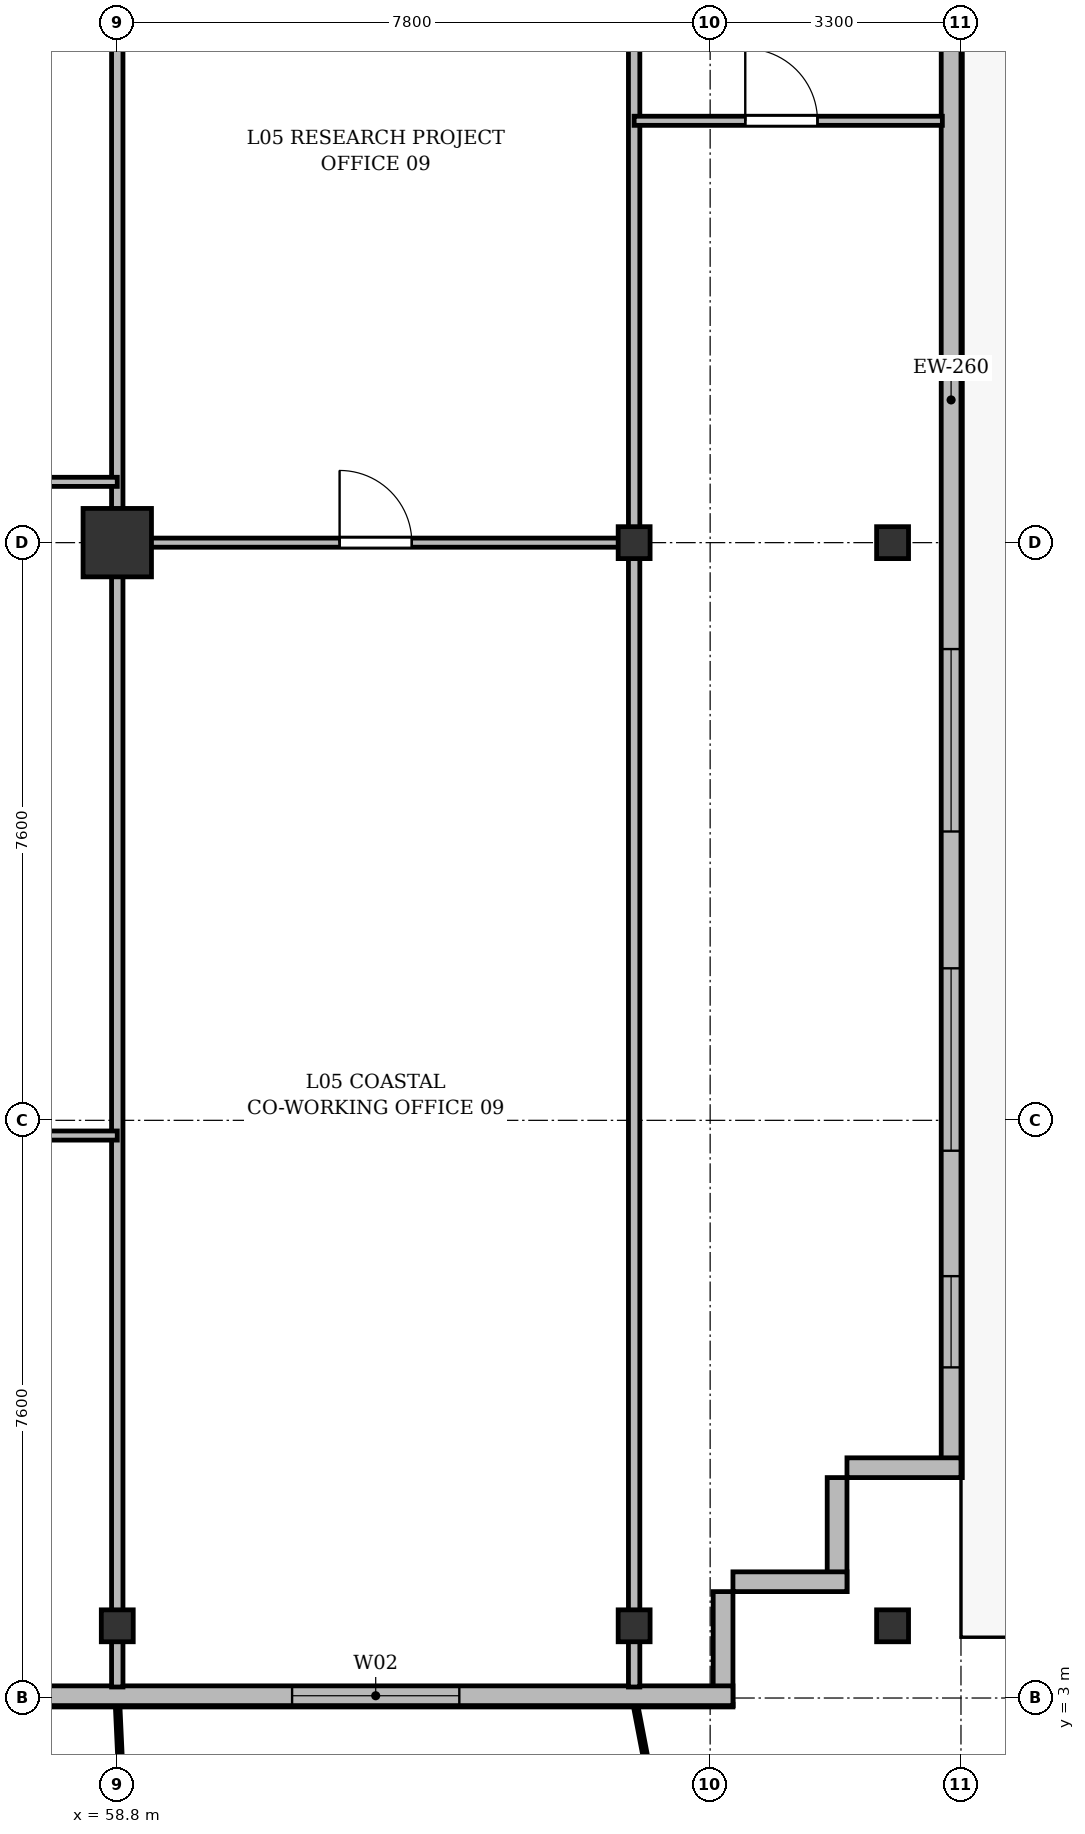
"""IFC4 building model, lengths in metres.
Left out: names, types, materials, properties, quantities, classifications, styles, units other than length and angle.
Written with IfcOpenShell. Run it as: python <this file> out.ifc"""

import sys

from ifc_helpers import new_model, si_unit, direction, frame, frame_2d, origin, origin_2d, place, context, subcontext, project, spatial, rectangle, i_section, extrude, source, transform, mapped, element, fill, save


model = new_model("IFC4")
c1 = context("Model", 3, precision=1e-05, world=origin(), true_north=direction((0.0, 1.0)))
c2 = subcontext(c1, "Body", "Model", "MODEL_VIEW")
j1 = project(units=[si_unit("LENGTHUNIT", "METRE"), si_unit("PLANEANGLEUNIT", "RADIAN")], contexts=[c1])
p1 = place(None, origin())
s1 = spatial("IfcSite", under=j1, at=p1, CompositionType="ELEMENT")
p2 = place(p1, origin())
s2 = spatial("IfcBuilding", under=s1, at=p2, CompositionType="ELEMENT")
p3 = place(p2, frame((0.0, 0.0, 23.5)))
s3 = spatial("IfcBuildingStorey", under=s2, at=p3, CompositionType="ELEMENT", Elevation=23.5)
m1 = source(origin(), c2, "Body", "SweptSolid", [
    extrude(i_section(OverallWidth=0.42, OverallDepth=0.42, WebThickness=0.026, FlangeThickness=0.04, at=origin_2d()), origin(), (0.0, 0.0, 1.0), 3.6),
])
p4 = place(p3, frame((58.8, 3.95, 0.0), z_axis=(0.0, 0.0, 1.0), x_axis=(1.0, 0.0, 0.0)))
e1 = element("IfcColumn", 1, at=p4, inside=s3, PredefinedType="COLUMN", context=c2, shape_type="MappedRepresentation", body=[
    mapped(m1, transform((0.0, 0.0, 0.0), x_axis=(1.0, 0.0, 0.0), y_axis=(0.0, 1.0, 0.0), z_axis=(0.0, 0.0, 1.0), scale=1.0)),
])
m2 = source(origin(), c2, "Body", "SweptSolid", [
    extrude(rectangle(XDim=0.9, YDim=0.9, at=origin_2d()), origin(), (0.0, 0.0, 1.0), 3.6),
])
p5 = place(p3, frame((58.8, 18.2, 0.0), z_axis=(0.0, 0.0, 1.0), x_axis=(1.0, 0.0, 0.0)))
e2 = element("IfcColumn", 2, at=p5, inside=s3, PredefinedType="COLUMN", context=c2, shape_type="MappedRepresentation", body=[
    mapped(m2, transform((0.0, 0.0, 0.0), x_axis=(1.0, 0.0, 0.0), y_axis=(0.0, 1.0, 0.0), z_axis=(0.0, 0.0, 1.0), scale=1.0)),
])
for number, where, z_axis, x_axis in (
    (3, (65.6, 3.95, 0.0), (0.0, 0.0, 1.0), (1.0, 0.0, 0.0)),
    (4, (65.6, 18.2, 0.0), (0.0, 0.0, 1.0), (1.0, 0.0, 0.0)),
    (5, (69.0, 3.95, 0.0), (0.0, 0.0, 1.0), (1.0, 0.0, 0.0)),
    (6, (69.0, 18.2, 0.0), (0.0, 0.0, 1.0), (1.0, 0.0, 0.0)),
):
    element("IfcColumn", number, at=place(p3, frame(where, z_axis=z_axis, x_axis=x_axis)), inside=s3, PredefinedType="COLUMN", context=c2, shape_type="MappedRepresentation", body=[
        mapped(m1, transform((0.0, 0.0, 0.0), x_axis=(1.0, 0.0, 0.0), y_axis=(0.0, 1.0, 0.0), z_axis=(0.0, 0.0, 1.0), scale=1.0)),
    ])
p6 = place(p3, frame((69.77, 45.5, 0.0), z_axis=(0.0, 0.0, 1.0), x_axis=(0.0, -1.0, 0.0)))
e7 = element("IfcWall", 7, at=p6, inside=s3, PredefinedType="SOLIDWALL", context=c2, shape_type="SweptSolid", body=[
    extrude(rectangle(XDim=39.6, YDim=0.26, at=frame_2d((19.8, 0.0))), origin(), (0.0, 0.0, 1.0), 3.34),
])
p7 = place(p6, frame((9.745, 0.0, 0.0)))
e8 = element("IfcOpeningElement", 8, at=p7, cuts=e7, PredefinedType="OPENING", context=c2, shape_type="SweptSolid", body=[
    extrude(rectangle(XDim=1.2, YDim=2.2, at=frame_2d((0.6, 1.1))), frame((0.0, 0.14, 0.0), z_axis=(0.0, -1.0, 0.0), x_axis=(1.0, 0.0, 0.0)), (0.0, 0.0, 1.0), 0.28),
])
p8 = place(p6, frame((36.95, 0.0, 0.92)))
e9 = element("IfcOpeningElement", 9, at=p8, cuts=e7, PredefinedType="OPENING", context=c2, shape_type="SweptSolid", body=[
    extrude(rectangle(XDim=1.2, YDim=1.65, at=frame_2d((0.6, 0.825))), frame((0.0, 0.14, 0.0), z_axis=(0.0, -1.0, 0.0), x_axis=(1.0, 0.0, 0.0)), (0.0, 0.0, 1.0), 0.28),
])
p9 = place(p6, frame((32.9, 0.0, 0.92)))
e10 = element("IfcOpeningElement", 10, at=p9, cuts=e7, PredefinedType="OPENING", context=c2, shape_type="SweptSolid", body=[
    extrude(rectangle(XDim=2.4, YDim=2.1, at=frame_2d((1.2, 1.05))), frame((0.0, 0.14, 0.0), z_axis=(0.0, -1.0, 0.0), x_axis=(1.0, 0.0, 0.0)), (0.0, 0.0, 1.0), 0.28),
])
p10 = place(p6, frame((28.7, 0.0, 0.92)))
e11 = element("IfcOpeningElement", 11, at=p10, cuts=e7, PredefinedType="OPENING", context=c2, shape_type="SweptSolid", body=[
    extrude(rectangle(XDim=2.4, YDim=2.1, at=frame_2d((1.2, 1.05))), frame((0.0, 0.14, 0.0), z_axis=(0.0, -1.0, 0.0), x_axis=(1.0, 0.0, 0.0)), (0.0, 0.0, 1.0), 0.28),
])
p11 = place(p6, frame((4.5, 0.0, 0.92)))
e12 = element("IfcOpeningElement", 12, at=p11, cuts=e7, PredefinedType="OPENING", context=c2, shape_type="SweptSolid", body=[
    extrude(rectangle(XDim=1.2, YDim=1.65, at=frame_2d((0.6, 0.825))), frame((0.0, 0.14, 0.0), z_axis=(0.0, -1.0, 0.0), x_axis=(1.0, 0.0, 0.0)), (0.0, 0.0, 1.0), 0.28),
])
p12 = place(p6, frame((1.15, 0.0, 0.92)))
e13 = element("IfcOpeningElement", 13, at=p12, cuts=e7, PredefinedType="OPENING", context=c2, shape_type="SweptSolid", body=[
    extrude(rectangle(XDim=1.2, YDim=1.65, at=frame_2d((0.6, 0.825))), frame((0.0, 0.14, 0.0), z_axis=(0.0, -1.0, 0.0), x_axis=(1.0, 0.0, 0.0)), (0.0, 0.0, 1.0), 0.28),
])
p13 = place(p3, frame((69.9, 6.03, 0.0), z_axis=(0.0, 0.0, 1.0), x_axis=(-1.0, 0.0, 0.0)))
e14 = element("IfcWall", 14, at=p13, inside=s3, PredefinedType="SOLIDWALL", context=c2, shape_type="SweptSolid", body=[
    extrude(rectangle(XDim=1.5, YDim=0.26, at=frame_2d((0.75, 0.0))), origin(), (0.0, 0.0, 1.0), 2.752),
])
for number, where, z_axis, x_axis in (
    (15, (68.27, 5.9, 0.0), (0.0, 0.0, 1.0), (0.0, -1.0, 0.0)),
    (16, (68.4, 4.53, 0.0), (0.0, 0.0, 1.0), (-1.0, 0.0, 0.0)),
):
    element("IfcWall", number, at=place(p3, frame(where, z_axis=z_axis, x_axis=x_axis)), inside=s3, PredefinedType="SOLIDWALL", context=c2, shape_type="SweptSolid", body=[
        extrude(rectangle(XDim=1.5, YDim=0.26, at=frame_2d((0.75, 0.0))), origin(), (0.0, 0.0, 1.0), 3.34),
    ])
p14 = place(p3, frame((66.77, 4.4, 0.0), z_axis=(0.0, 0.0, 1.0), x_axis=(0.0, -1.0, 0.0)))
e17 = element("IfcWall", 17, at=p14, inside=s3, PredefinedType="SOLIDWALL", context=c2, shape_type="SweptSolid", body=[
    extrude(rectangle(XDim=1.5, YDim=0.26, at=frame_2d((0.75, 0.0))), origin(), (0.0, 0.0, 1.0), 2.69),
])
p15 = place(p3, frame((66.9, 3.03, 0.0), z_axis=(0.0, 0.0, 1.0), x_axis=(-1.0, 0.0, 0.0)))
e18 = element("IfcWall", 18, at=p15, inside=s3, PredefinedType="SOLIDWALL", context=c2, shape_type="SweptSolid", body=[
    extrude(rectangle(XDim=59.4, YDim=0.26, at=frame_2d((29.7, 0.0))), origin(), (0.0, 0.0, 1.0), 3.34),
])
p16 = place(p15, frame((3.6, 0.0, 0.9)))
e19 = element("IfcOpeningElement", 19, at=p16, cuts=e18, PredefinedType="OPENING", context=c2, shape_type="SweptSolid", body=[
    extrude(rectangle(XDim=2.2, YDim=1.8, at=frame_2d((1.1, 0.9))), frame((0.0, 0.14, 0.0), z_axis=(0.0, -1.0, 0.0), x_axis=(1.0, 0.0, 0.0)), (0.0, 0.0, 1.0), 0.28),
])
p17 = place(p15, frame((9.3, 0.0, 0.9)))
e20 = element("IfcOpeningElement", 20, at=p17, cuts=e18, PredefinedType="OPENING", context=c2, shape_type="SweptSolid", body=[
    extrude(rectangle(XDim=1.5, YDim=1.75, at=frame_2d((0.75, 0.875))), frame((0.0, 0.14, 0.0), z_axis=(0.0, -1.0, 0.0), x_axis=(1.0, 0.0, 0.0)), (0.0, 0.0, 1.0), 0.28),
])
p18 = place(p15, frame((12.95, 0.0, 0.9)))
e21 = element("IfcOpeningElement", 21, at=p18, cuts=e18, PredefinedType="OPENING", context=c2, shape_type="SweptSolid", body=[
    extrude(rectangle(XDim=2.0, YDim=1.95, at=frame_2d((1.0, 0.975))), frame((0.0, 0.14, 0.0), z_axis=(0.0, -1.0, 0.0), x_axis=(1.0, 0.0, 0.0)), (0.0, 0.0, 1.0), 0.28),
])
p19 = place(p15, frame((17.007, 0.0, 0.0)))
e22 = element("IfcOpeningElement", 22, at=p19, cuts=e18, PredefinedType="OPENING", context=c2, shape_type="SweptSolid", body=[
    extrude(rectangle(XDim=1.2, YDim=2.2, at=frame_2d((0.6, 1.1))), frame((0.0, 0.14, 0.0), z_axis=(0.0, -1.0, 0.0), x_axis=(1.0, 0.0, 0.0)), (0.0, 0.0, 1.0), 0.28),
])
p20 = place(p15, frame((20.4, 0.0, 0.9)))
e23 = element("IfcOpeningElement", 23, at=p20, cuts=e18, PredefinedType="OPENING", context=c2, shape_type="SweptSolid", body=[
    extrude(rectangle(XDim=1.8, YDim=1.8, at=frame_2d((0.9, 0.9))), frame((0.0, 0.14, 0.0), z_axis=(0.0, -1.0, 0.0), x_axis=(1.0, 0.0, 0.0)), (0.0, 0.0, 1.0), 0.28),
])
p21 = place(p15, frame((23.65, 0.0, 0.9)))
e24 = element("IfcOpeningElement", 24, at=p21, cuts=e18, PredefinedType="OPENING", context=c2, shape_type="SweptSolid", body=[
    extrude(rectangle(XDim=2.2, YDim=1.8, at=frame_2d((1.1, 0.9))), frame((0.0, 0.14, 0.0), z_axis=(0.0, -1.0, 0.0), x_axis=(1.0, 0.0, 0.0)), (0.0, 0.0, 1.0), 0.28),
])
p22 = place(p15, frame((27.3, 0.0, 0.9)))
e25 = element("IfcOpeningElement", 25, at=p22, cuts=e18, PredefinedType="OPENING", context=c2, shape_type="SweptSolid", body=[
    extrude(rectangle(XDim=1.5, YDim=1.75, at=frame_2d((0.75, 0.875))), frame((0.0, 0.14, 0.0), z_axis=(0.0, -1.0, 0.0), x_axis=(1.0, 0.0, 0.0)), (0.0, 0.0, 1.0), 0.28),
])
p23 = place(p15, frame((32.0, 0.0, 0.9)))
e26 = element("IfcOpeningElement", 26, at=p23, cuts=e18, PredefinedType="OPENING", context=c2, shape_type="SweptSolid", body=[
    extrude(rectangle(XDim=2.0, YDim=1.95, at=frame_2d((1.0, 0.975))), frame((0.0, 0.14, 0.0), z_axis=(0.0, -1.0, 0.0), x_axis=(1.0, 0.0, 0.0)), (0.0, 0.0, 1.0), 0.28),
])
p24 = place(p15, frame((36.675, 0.0, 0.9)))
e27 = element("IfcOpeningElement", 27, at=p24, cuts=e18, PredefinedType="OPENING", context=c2, shape_type="SweptSolid", body=[
    extrude(rectangle(XDim=1.65, YDim=1.85, at=frame_2d((0.825, 0.925))), frame((0.0, 0.14, 0.0), z_axis=(0.0, -1.0, 0.0), x_axis=(1.0, 0.0, 0.0)), (0.0, 0.0, 1.0), 0.28),
])
p25 = place(p15, frame((39.0, 0.0, 0.9)))
e28 = element("IfcOpeningElement", 28, at=p25, cuts=e18, PredefinedType="OPENING", context=c2, shape_type="SweptSolid", body=[
    extrude(rectangle(XDim=1.8, YDim=1.8, at=frame_2d((0.9, 0.9))), frame((0.0, 0.14, 0.0), z_axis=(0.0, -1.0, 0.0), x_axis=(1.0, 0.0, 0.0)), (0.0, 0.0, 1.0), 0.28),
])
p26 = place(p15, frame((41.55, 0.0, 0.9)))
e29 = element("IfcOpeningElement", 29, at=p26, cuts=e18, PredefinedType="OPENING", context=c2, shape_type="SweptSolid", body=[
    extrude(rectangle(XDim=1.5, YDim=1.75, at=frame_2d((0.75, 0.875))), frame((0.0, 0.14, 0.0), z_axis=(0.0, -1.0, 0.0), x_axis=(1.0, 0.0, 0.0)), (0.0, 0.0, 1.0), 0.28),
])
p27 = place(p15, frame((45.435, 0.0, 0.0)))
e30 = element("IfcOpeningElement", 30, at=p27, cuts=e18, PredefinedType="OPENING", context=c2, shape_type="SweptSolid", body=[
    extrude(rectangle(XDim=1.2, YDim=2.2, at=frame_2d((0.6, 1.1))), frame((0.0, 0.14, 0.0), z_axis=(0.0, -1.0, 0.0), x_axis=(1.0, 0.0, 0.0)), (0.0, 0.0, 1.0), 0.28),
])
p28 = place(p15, frame((48.35, 0.0, 0.9)))
e31 = element("IfcOpeningElement", 31, at=p28, cuts=e18, PredefinedType="OPENING", context=c2, shape_type="SweptSolid", body=[
    extrude(rectangle(XDim=2.0, YDim=1.95, at=frame_2d((1.0, 0.975))), frame((0.0, 0.14, 0.0), z_axis=(0.0, -1.0, 0.0), x_axis=(1.0, 0.0, 0.0)), (0.0, 0.0, 1.0), 0.28),
])
p29 = place(p15, frame((52.175, 0.0, 0.9)))
e32 = element("IfcOpeningElement", 32, at=p29, cuts=e18, PredefinedType="OPENING", context=c2, shape_type="SweptSolid", body=[
    extrude(rectangle(XDim=1.65, YDim=1.85, at=frame_2d((0.825, 0.925))), frame((0.0, 0.14, 0.0), z_axis=(0.0, -1.0, 0.0), x_axis=(1.0, 0.0, 0.0)), (0.0, 0.0, 1.0), 0.28),
])
p30 = place(p15, frame((55.5, 0.0, 0.9)))
e33 = element("IfcOpeningElement", 33, at=p30, cuts=e18, PredefinedType="OPENING", context=c2, shape_type="SweptSolid", body=[
    extrude(rectangle(XDim=1.8, YDim=1.8, at=frame_2d((0.9, 0.9))), frame((0.0, 0.14, 0.0), z_axis=(0.0, -1.0, 0.0), x_axis=(1.0, 0.0, 0.0)), (0.0, 0.0, 1.0), 0.28),
])
for number, where, z_axis, x_axis in (
    (34, (58.8, 3.145, 0.0), (0.0, 0.0, 1.0), (0.0, 1.0, 0.0)),
    (35, (65.6, 3.145, 0.0), (0.0, 0.0, 1.0), (0.0, 1.0, 0.0)),
):
    element("IfcWall", number, at=place(p3, frame(where, z_axis=z_axis, x_axis=x_axis)), inside=s3, PredefinedType="PARTITIONING", context=c2, shape_type="SweptSolid", body=[
        extrude(rectangle(XDim=24.455, YDim=0.15, at=frame_2d((12.228, 0.0))), origin(), (0.0, 0.0, 1.0), 2.752),
    ])
p31 = place(p3, frame((51.0, 19.0, 0.0), z_axis=(0.0, 0.0, 1.0), x_axis=(1.0, 0.0, 0.0)))
e36 = element("IfcWall", 36, at=p31, inside=s3, PredefinedType="PARTITIONING", context=c2, shape_type="SweptSolid", body=[
    extrude(rectangle(XDim=7.8, YDim=0.12, at=frame_2d((3.9, 0.0))), origin(), (0.0, 0.0, 1.0), 2.752),
])
p32 = place(p31, frame((3.333, 0.0, 0.0)))
e37 = element("IfcOpeningElement", 37, at=p32, cuts=e36, PredefinedType="OPENING", context=c2, shape_type="SweptSolid", body=[
    extrude(rectangle(XDim=0.95, YDim=2.15, at=frame_2d((0.475, 1.075))), frame((0.0, 0.07, 0.0), z_axis=(0.0, -1.0, 0.0), x_axis=(1.0, 0.0, 0.0)), (0.0, 0.0, 1.0), 0.14),
])
p33 = place(p3, frame((54.9, 10.4, 0.0), z_axis=(0.0, 0.0, 1.0), x_axis=(1.0, 0.0, 0.0)))
e38 = element("IfcWall", 38, at=p33, inside=s3, PredefinedType="PARTITIONING", context=c2, shape_type="SweptSolid", body=[
    extrude(rectangle(XDim=3.9, YDim=0.12, at=frame_2d((1.95, 0.0))), origin(), (0.0, 0.0, 1.0), 2.752),
])
p34 = place(p33, frame((1.475, 0.0, 0.0)))
e39 = element("IfcOpeningElement", 39, at=p34, cuts=e38, PredefinedType="OPENING", context=c2, shape_type="SweptSolid", body=[
    extrude(rectangle(XDim=0.95, YDim=2.15, at=frame_2d((0.475, 1.075))), frame((0.0, 0.07, 0.0), z_axis=(0.0, -1.0, 0.0), x_axis=(1.0, 0.0, 0.0)), (0.0, 0.0, 1.0), 0.14),
])
p35 = place(p3, frame((58.8, 18.2, 0.0), z_axis=(0.0, 0.0, 1.0), x_axis=(1.0, 0.0, 0.0)))
e40 = element("IfcWall", 40, at=p35, inside=s3, PredefinedType="PARTITIONING", context=c2, shape_type="SweptSolid", body=[
    extrude(rectangle(XDim=6.8, YDim=0.12, at=frame_2d((3.4, 0.0))), origin(), (0.0, 0.0, 1.0), 2.69),
])
p36 = place(p35, frame((2.925, 0.0, 0.0)))
e41 = element("IfcOpeningElement", 41, at=p36, cuts=e40, PredefinedType="OPENING", context=c2, shape_type="SweptSolid", body=[
    extrude(rectangle(XDim=0.95, YDim=2.15, at=frame_2d((0.475, 1.075))), frame((0.0, 0.07, 0.0), z_axis=(0.0, -1.0, 0.0), x_axis=(1.0, 0.0, 0.0)), (0.0, 0.0, 1.0), 0.14),
])
p37 = place(p3, frame((65.6, 23.75, 0.0), z_axis=(0.0, 0.0, 1.0), x_axis=(1.0, 0.0, 0.0)))
e42 = element("IfcWall", 42, at=p37, inside=s3, PredefinedType="PARTITIONING", context=c2, shape_type="SweptSolid", body=[
    extrude(rectangle(XDim=4.055, YDim=0.12, at=frame_2d((2.027, 0.0))), origin(), (0.0, 0.0, 1.0), 2.752),
])
p38 = place(p37, frame((1.462, 0.0, 0.0)))
e43 = element("IfcOpeningElement", 43, at=p38, cuts=e42, PredefinedType="OPENING", context=c2, shape_type="SweptSolid", body=[
    extrude(rectangle(XDim=0.95, YDim=2.15, at=frame_2d((0.475, 1.075))), frame((0.0, 0.07, 0.0), z_axis=(0.0, -1.0, 0.0), x_axis=(1.0, 0.0, 0.0)), (0.0, 0.0, 1.0), 0.14),
])
m3 = source(origin(), c2, "Body", "SweptSolid", [
    extrude(rectangle(XDim=1.2, YDim=1.65, at=frame_2d((0.6, 0.825))), frame((0.0, 0.03, 0.0), z_axis=(0.0, -1.0, 0.0), x_axis=(1.0, 0.0, 0.0)), (0.0, 0.0, 1.0), 0.06),
])
p39 = place(p8, origin())
e44 = element("IfcWindow", 44, at=p39, inside=s3, PartitioningType="SINGLE_PANEL", PredefinedType="WINDOW", context=c2, shape_type="MappedRepresentation", body=[
    mapped(m3, transform((0.0, 0.0, 0.0), x_axis=(1.0, 0.0, 0.0), y_axis=(0.0, 1.0, 0.0), z_axis=(0.0, 0.0, 1.0), scale=1.0)),
])
fill(e9, e44)
m4 = source(origin(), c2, "Body", "SweptSolid", [
    extrude(rectangle(XDim=2.4, YDim=2.1, at=frame_2d((1.2, 1.05))), frame((0.0, 0.03, 0.0), z_axis=(0.0, -1.0, 0.0), x_axis=(1.0, 0.0, 0.0)), (0.0, 0.0, 1.0), 0.06),
])
p40 = place(p9, origin())
e45 = element("IfcWindow", 45, at=p40, inside=s3, PartitioningType="SINGLE_PANEL", PredefinedType="WINDOW", context=c2, shape_type="MappedRepresentation", body=[
    mapped(m4, transform((0.0, 0.0, 0.0), x_axis=(1.0, 0.0, 0.0), y_axis=(0.0, 1.0, 0.0), z_axis=(0.0, 0.0, 1.0), scale=1.0)),
])
fill(e10, e45)
p41 = place(p10, origin())
e46 = element("IfcWindow", 46, at=p41, inside=s3, PartitioningType="SINGLE_PANEL", PredefinedType="WINDOW", context=c2, shape_type="MappedRepresentation", body=[
    mapped(m4, transform((0.0, 0.0, 0.0), x_axis=(1.0, 0.0, 0.0), y_axis=(0.0, 1.0, 0.0), z_axis=(0.0, 0.0, 1.0), scale=1.0)),
])
fill(e11, e46)
m5 = source(origin(), c2, "Body", "SweptSolid", [
    extrude(rectangle(XDim=2.2, YDim=1.8, at=frame_2d((1.1, 0.9))), frame((0.0, 0.03, 0.0), z_axis=(0.0, -1.0, 0.0), x_axis=(1.0, 0.0, 0.0)), (0.0, 0.0, 1.0), 0.06),
])
p42 = place(p16, origin())
e47 = element("IfcWindow", 47, at=p42, inside=s3, PartitioningType="SINGLE_PANEL", PredefinedType="WINDOW", context=c2, shape_type="MappedRepresentation", body=[
    mapped(m5, transform((0.0, 0.0, 0.0), x_axis=(1.0, 0.0, 0.0), y_axis=(0.0, 1.0, 0.0), z_axis=(0.0, 0.0, 1.0), scale=1.0)),
])
fill(e19, e47)
m6 = source(origin(), c2, "Body", "SweptSolid", [
    extrude(rectangle(XDim=0.95, YDim=2.15, at=frame_2d((0.475, 1.075))), frame((0.0, 0.025, 0.0), z_axis=(0.0, -1.0, 0.0), x_axis=(1.0, 0.0, 0.0)), (0.0, 0.0, 1.0), 0.05),
])
p43 = place(p36, origin())
e48 = element("IfcDoor", 48, at=p43, inside=s3, OperationType="SINGLE_SWING_LEFT", PredefinedType="DOOR", context=c2, shape_type="MappedRepresentation", body=[
    mapped(m6, transform((0.0, 0.0, 0.0), x_axis=(1.0, 0.0, 0.0), y_axis=(0.0, 1.0, 0.0), z_axis=(0.0, 0.0, 1.0), scale=1.0)),
])
fill(e41, e48)
p44 = place(p38, origin())
e49 = element("IfcDoor", 49, at=p44, inside=s3, OperationType="SINGLE_SWING_LEFT", PredefinedType="DOOR", context=c2, shape_type="MappedRepresentation", body=[
    mapped(m6, transform((0.0, 0.0, 0.0), x_axis=(1.0, 0.0, 0.0), y_axis=(0.0, 1.0, 0.0), z_axis=(0.0, 0.0, 1.0), scale=1.0)),
])
fill(e43, e49)
save(model, sys.argv[1])
